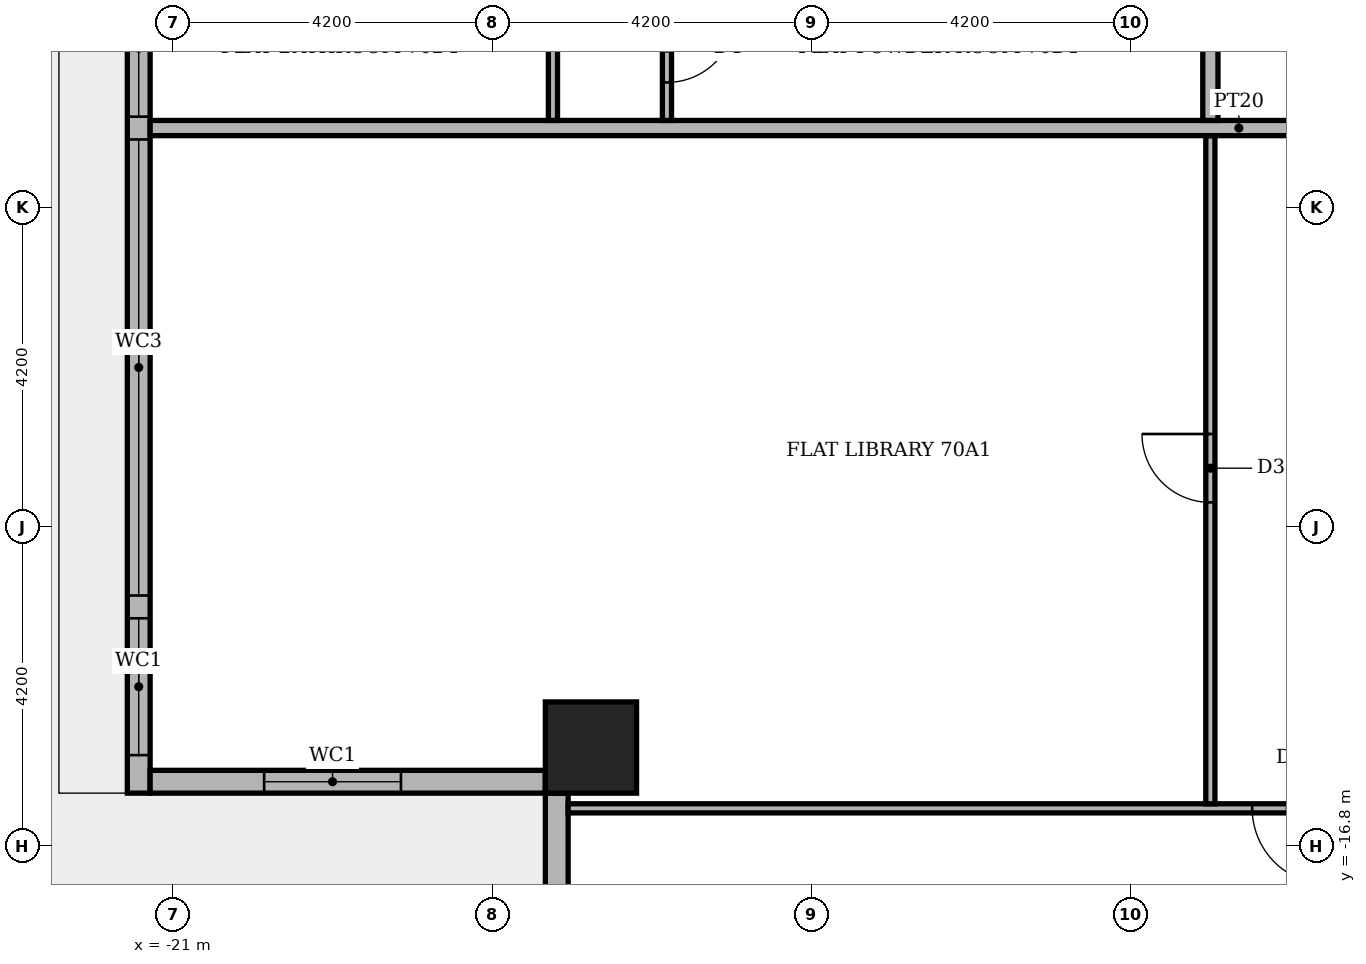
"""IFC4 building model, lengths in metres.
Left out: names, types, materials, properties, quantities, classifications, styles, units other than length and angle.
Written with IfcOpenShell. Run it as: python <this file> out.ifc"""

import sys

from ifc_helpers import new_model, si_unit, direction, frame, frame_2d, origin, origin_2d, place, context, subcontext, project, spatial, rectangle, extrude, element, fill, save


model = new_model("IFC4")
c1 = context("Model", 3, precision=1e-05, world=origin(), true_north=direction((0.0, 1.0)))
c2 = subcontext(c1, "Body", "Model", "MODEL_VIEW")
j1 = project(units=[si_unit("LENGTHUNIT", "METRE"), si_unit("PLANEANGLEUNIT", "RADIAN")], contexts=[c1])
p1 = place(None, origin())
s1 = spatial("IfcSite", under=j1, at=p1, CompositionType="ELEMENT")
p2 = place(p1, origin())
s2 = spatial("IfcBuilding", under=s1, at=p2, CompositionType="ELEMENT")
p3 = place(p2, frame((0.0, 0.0, 292.8)))
s3 = spatial("IfcBuildingStorey", under=s2, at=p3, CompositionType="ELEMENT", Elevation=292.8)
p4 = place(p3, frame((-15.5, -15.5, -0.35), z_axis=(0.0, 0.0, 1.0), x_axis=(1.0, 0.0, 0.0)))
e1 = element("IfcColumn", 1, at=p4, inside=s3, PredefinedType="COLUMN", context=c2, shape_type="SweptSolid", body=[
    extrude(rectangle(XDim=1.2, YDim=1.2, at=origin_2d()), origin(), (0.0, 0.0, 1.0), 4.25),
])
p5 = place(p3, frame((-21.45, 15.8, 0.0), z_axis=(0.0, 0.0, 1.0), x_axis=(0.0, -1.0, 0.0)))
e2 = element("IfcWall", 2, at=p5, inside=s3, PredefinedType="STANDARD", context=c2, shape_type="SweptSolid", body=[
    extrude(rectangle(XDim=31.9, YDim=0.3, at=frame_2d((15.95, 0.0))), origin(), (0.0, 0.0, 1.0), 3.55),
])
p6 = place(p5, frame((0.2, 0.0, 0.6)))
e3 = element("IfcOpeningElement", 3, at=p6, cuts=e2, PredefinedType="OPENING", context=c2, shape_type="SweptSolid", body=[
    extrude(rectangle(XDim=3.9, YDim=2.4, at=frame_2d((1.95, 1.2))), frame((0.0, 0.16, 0.0), z_axis=(0.0, -1.0, 0.0), x_axis=(1.0, 0.0, 0.0)), (0.0, 0.0, 1.0), 0.32),
])
p7 = place(p5, frame((4.4, 0.0, 0.0)))
e4 = element("IfcOpeningElement", 4, at=p7, cuts=e2, PredefinedType="OPENING", context=c2, shape_type="SweptSolid", body=[
    extrude(rectangle(XDim=3.9, YDim=2.4, at=frame_2d((1.95, 1.2))), frame((0.0, 0.16, 0.0), z_axis=(0.0, -1.0, 0.0), x_axis=(1.0, 0.0, 0.0)), (0.0, 0.0, 1.0), 0.32),
])
p8 = place(p5, frame((8.6, 0.0, 0.6)))
e5 = element("IfcOpeningElement", 5, at=p8, cuts=e2, PredefinedType="OPENING", context=c2, shape_type="SweptSolid", body=[
    extrude(rectangle(XDim=1.8, YDim=2.4, at=frame_2d((0.9, 1.2))), frame((0.0, 0.16, 0.0), z_axis=(0.0, -1.0, 0.0), x_axis=(1.0, 0.0, 0.0)), (0.0, 0.0, 1.0), 0.32),
])
p9 = place(p5, frame((10.7, 0.0, 0.6)))
e6 = element("IfcOpeningElement", 6, at=p9, cuts=e2, PredefinedType="OPENING", context=c2, shape_type="SweptSolid", body=[
    extrude(rectangle(XDim=1.8, YDim=2.4, at=frame_2d((0.9, 1.2))), frame((0.0, 0.16, 0.0), z_axis=(0.0, -1.0, 0.0), x_axis=(1.0, 0.0, 0.0)), (0.0, 0.0, 1.0), 0.32),
])
p10 = place(p5, frame((12.8, 0.0, 0.0)))
e7 = element("IfcOpeningElement", 7, at=p10, cuts=e2, PredefinedType="OPENING", context=c2, shape_type="SweptSolid", body=[
    extrude(rectangle(XDim=3.9, YDim=2.4, at=frame_2d((1.95, 1.2))), frame((0.0, 0.16, 0.0), z_axis=(0.0, -1.0, 0.0), x_axis=(1.0, 0.0, 0.0)), (0.0, 0.0, 1.0), 0.32),
])
p11 = place(p5, frame((17.0, 0.0, 0.6)))
e8 = element("IfcOpeningElement", 8, at=p11, cuts=e2, PredefinedType="OPENING", context=c2, shape_type="SweptSolid", body=[
    extrude(rectangle(XDim=1.8, YDim=2.4, at=frame_2d((0.9, 1.2))), frame((0.0, 0.16, 0.0), z_axis=(0.0, -1.0, 0.0), x_axis=(1.0, 0.0, 0.0)), (0.0, 0.0, 1.0), 0.32),
])
p12 = place(p5, frame((19.1, 0.0, 0.6)))
e9 = element("IfcOpeningElement", 9, at=p12, cuts=e2, PredefinedType="OPENING", context=c2, shape_type="SweptSolid", body=[
    extrude(rectangle(XDim=1.8, YDim=2.4, at=frame_2d((0.9, 1.2))), frame((0.0, 0.16, 0.0), z_axis=(0.0, -1.0, 0.0), x_axis=(1.0, 0.0, 0.0)), (0.0, 0.0, 1.0), 0.32),
])
p13 = place(p5, frame((21.2, 0.0, 0.6)))
e10 = element("IfcOpeningElement", 10, at=p13, cuts=e2, PredefinedType="OPENING", context=c2, shape_type="SweptSolid", body=[
    extrude(rectangle(XDim=1.8, YDim=2.4, at=frame_2d((0.9, 1.2))), frame((0.0, 0.16, 0.0), z_axis=(0.0, -1.0, 0.0), x_axis=(1.0, 0.0, 0.0)), (0.0, 0.0, 1.0), 0.32),
])
p14 = place(p5, frame((23.3, 0.0, 0.6)))
e11 = element("IfcOpeningElement", 11, at=p14, cuts=e2, PredefinedType="OPENING", context=c2, shape_type="SweptSolid", body=[
    extrude(rectangle(XDim=6.0, YDim=2.4, at=frame_2d((3.0, 1.2))), frame((0.0, 0.16, 0.0), z_axis=(0.0, -1.0, 0.0), x_axis=(1.0, 0.0, 0.0)), (0.0, 0.0, 1.0), 0.32),
])
p15 = place(p5, frame((29.6, 0.0, 0.6)))
e12 = element("IfcOpeningElement", 12, at=p15, cuts=e2, PredefinedType="OPENING", context=c2, shape_type="SweptSolid", body=[
    extrude(rectangle(XDim=1.8, YDim=2.4, at=frame_2d((0.9, 1.2))), frame((0.0, 0.16, 0.0), z_axis=(0.0, -1.0, 0.0), x_axis=(1.0, 0.0, 0.0)), (0.0, 0.0, 1.0), 0.32),
])
p16 = place(p3, frame((-21.3, -15.95, 0.0), z_axis=(0.0, 0.0, 1.0), x_axis=(1.0, 0.0, 0.0)))
e13 = element("IfcWall", 13, at=p16, inside=s3, PredefinedType="STANDARD", context=c2, shape_type="SweptSolid", body=[
    extrude(rectangle(XDim=5.2, YDim=0.3, at=frame_2d((2.6, 0.0))), origin(), (0.0, 0.0, 1.0), 3.55),
])
p17 = place(p16, frame((1.5, 0.0, 0.6)))
e14 = element("IfcOpeningElement", 14, at=p17, cuts=e13, PredefinedType="OPENING", context=c2, shape_type="SweptSolid", body=[
    extrude(rectangle(XDim=1.8, YDim=2.4, at=frame_2d((0.9, 1.2))), frame((0.0, 0.16, 0.0), z_axis=(0.0, -1.0, 0.0), x_axis=(1.0, 0.0, 0.0)), (0.0, 0.0, 1.0), 0.32),
])
p18 = place(p3, frame((-15.95, -16.1, 0.0), z_axis=(0.0, 0.0, 1.0), x_axis=(0.0, -1.0, 0.0)))
e15 = element("IfcWall", 15, at=p18, inside=s3, PredefinedType="STANDARD", context=c2, shape_type="SweptSolid", body=[
    extrude(rectangle(XDim=5.5, YDim=0.3, at=frame_2d((2.75, 0.0))), origin(), (0.0, 0.0, 1.0), 3.55),
])
p19 = place(p18, frame((1.9, 0.0, 0.0)))
e16 = element("IfcOpeningElement", 16, at=p19, cuts=e15, PredefinedType="OPENING", context=c2, shape_type="SweptSolid", body=[
    extrude(rectangle(XDim=1.8, YDim=2.4, at=frame_2d((0.9, 1.2))), frame((0.0, 0.16, 0.0), z_axis=(0.0, -1.0, 0.0), x_axis=(1.0, 0.0, 0.0)), (0.0, 0.0, 1.0), 0.32),
])
p20 = place(p3, frame((-15.8, -16.3, 0.0), z_axis=(0.0, 0.0, 1.0), x_axis=(1.0, 0.0, 0.0)))
e17 = element("IfcWall", 17, at=p20, inside=s3, PredefinedType="PARTITIONING", context=c2, shape_type="SweptSolid", body=[
    extrude(rectangle(XDim=23.05, YDim=0.12, at=frame_2d((11.525, 0.0))), origin(), (0.0, 0.0, 1.0), 3.55),
])
p21 = place(p20, frame((9.0, 0.0, 0.0)))
e18 = element("IfcOpeningElement", 18, at=p21, cuts=e17, PredefinedType="OPENING", context=c2, shape_type="SweptSolid", body=[
    extrude(rectangle(XDim=1.0, YDim=2.1, at=frame_2d((0.5, 1.05))), frame((0.0, 0.07, 0.0), z_axis=(0.0, -1.0, 0.0), x_axis=(1.0, 0.0, 0.0)), (0.0, 0.0, 1.0), 0.14),
])
p22 = place(p20, frame((12.15, 0.0, 0.0)))
e19 = element("IfcOpeningElement", 19, at=p22, cuts=e17, PredefinedType="OPENING", context=c2, shape_type="SweptSolid", body=[
    extrude(rectangle(XDim=1.0, YDim=2.1, at=frame_2d((0.5, 1.05))), frame((0.0, 0.07, 0.0), z_axis=(0.0, -1.0, 0.0), x_axis=(1.0, 0.0, 0.0)), (0.0, 0.0, 1.0), 0.14),
])
p23 = place(p20, frame((16.4, 0.0, 0.0)))
e20 = element("IfcOpeningElement", 20, at=p23, cuts=e17, PredefinedType="OPENING", context=c2, shape_type="SweptSolid", body=[
    extrude(rectangle(XDim=0.9, YDim=2.1, at=frame_2d((0.45, 1.05))), frame((0.0, 0.07, 0.0), z_axis=(0.0, -1.0, 0.0), x_axis=(1.0, 0.0, 0.0)), (0.0, 0.0, 1.0), 0.14),
])
p24 = place(p3, frame((-7.35, -16.24, 0.0), z_axis=(0.0, 0.0, 1.0), x_axis=(0.0, 1.0, 0.0)))
e21 = element("IfcWall", 21, at=p24, inside=s3, PredefinedType="PARTITIONING", context=c2, shape_type="SweptSolid", body=[
    extrude(rectangle(XDim=8.79, YDim=0.12, at=frame_2d((4.395, 0.0))), origin(), (0.0, 0.0, 1.0), 3.55),
])
p25 = place(p24, frame((3.965, 0.0, 0.0)))
e22 = element("IfcOpeningElement", 22, at=p25, cuts=e21, PredefinedType="OPENING", context=c2, shape_type="SweptSolid", body=[
    extrude(rectangle(XDim=0.9, YDim=2.1, at=frame_2d((0.45, 1.05))), frame((0.0, 0.07, 0.0), z_axis=(0.0, -1.0, 0.0), x_axis=(1.0, 0.0, 0.0)), (0.0, 0.0, 1.0), 0.14),
])
p26 = place(p3, frame((-21.3, -7.35, 0.0), z_axis=(0.0, 0.0, 1.0), x_axis=(1.0, 0.0, 0.0)))
e23 = element("IfcWall", 23, at=p26, inside=s3, PredefinedType="PARTITIONING", context=c2, shape_type="SweptSolid", body=[
    extrude(rectangle(XDim=28.65, YDim=0.2, at=frame_2d((14.325, 0.0))), origin(), (0.0, 0.0, 1.0), 3.55),
])
p27 = place(p26, frame((16.55, 0.0, 0.0)))
e24 = element("IfcOpeningElement", 24, at=p27, cuts=e23, PredefinedType="OPENING", context=c2, shape_type="SweptSolid", body=[
    extrude(rectangle(XDim=1.1, YDim=2.4, at=frame_2d((0.55, 1.2))), frame((0.0, 0.11, 0.0), z_axis=(0.0, -1.0, 0.0), x_axis=(1.0, 0.0, 0.0)), (0.0, 0.0, 1.0), 0.22),
])
p28 = place(p3, frame((-16.0, -7.25, 0.0), z_axis=(0.0, 0.0, 1.0), x_axis=(0.0, 1.0, 0.0)))
e25 = element("IfcWall", 25, at=p28, inside=s3, PredefinedType="PARTITIONING", context=c2, shape_type="SweptSolid", body=[
    extrude(rectangle(XDim=1.94, YDim=0.12, at=frame_2d((0.97, 0.0))), origin(), (0.0, 0.0, 1.0), 3.55),
])
p29 = place(p3, frame((-14.5, -7.25, 0.0), z_axis=(0.0, 0.0, 1.0), x_axis=(0.0, 1.0, 0.0)))
e26 = element("IfcWall", 26, at=p29, inside=s3, PredefinedType="PARTITIONING", context=c2, shape_type="SweptSolid", body=[
    extrude(rectangle(XDim=1.94, YDim=0.12, at=frame_2d((0.97, 0.0))), origin(), (0.0, 0.0, 1.0), 3.55),
])
p30 = place(p29, frame((0.5, 0.0, 0.0)))
e27 = element("IfcOpeningElement", 27, at=p30, cuts=e26, PredefinedType="OPENING", context=c2, shape_type="SweptSolid", body=[
    extrude(rectangle(XDim=0.9, YDim=2.1, at=frame_2d((0.45, 1.05))), frame((0.0, 0.07, 0.0), z_axis=(0.0, -1.0, 0.0), x_axis=(1.0, 0.0, 0.0)), (0.0, 0.0, 1.0), 0.14),
])
p31 = place(p3, frame((-7.35, -7.25, 0.0), z_axis=(0.0, 0.0, 1.0), x_axis=(0.0, 1.0, 0.0)))
e28 = element("IfcWall", 28, at=p31, inside=s3, PredefinedType="PARTITIONING", context=c2, shape_type="SweptSolid", body=[
    extrude(rectangle(XDim=14.5, YDim=0.2, at=frame_2d((7.25, 0.0))), origin(), (0.0, 0.0, 1.0), 3.55),
])
p32 = place(p31, frame((10.9, 0.0, 0.0)))
e29 = element("IfcOpeningElement", 29, at=p32, cuts=e28, PredefinedType="OPENING", context=c2, shape_type="SweptSolid", body=[
    extrude(rectangle(XDim=1.1, YDim=2.4, at=frame_2d((0.55, 1.2))), frame((0.0, 0.11, 0.0), z_axis=(0.0, -1.0, 0.0), x_axis=(1.0, 0.0, 0.0)), (0.0, 0.0, 1.0), 0.22),
])
p33 = place(p13, origin())
e30 = element("IfcWindow", 30, at=p33, inside=s3, PartitioningType="SINGLE_PANEL", PredefinedType="WINDOW", context=c2, shape_type="SweptSolid", body=[
    extrude(rectangle(XDim=1.8, YDim=2.4, at=frame_2d((0.9, 1.2))), frame((0.0, 0.03, 0.0), z_axis=(0.0, -1.0, 0.0), x_axis=(1.0, 0.0, 0.0)), (0.0, 0.0, 1.0), 0.06),
])
fill(e10, e30)
p34 = place(p14, origin())
e31 = element("IfcWindow", 31, at=p34, inside=s3, PartitioningType="SINGLE_PANEL", PredefinedType="WINDOW", context=c2, shape_type="SweptSolid", body=[
    extrude(rectangle(XDim=6.0, YDim=2.4, at=frame_2d((3.0, 1.2))), frame((0.0, 0.03, 0.0), z_axis=(0.0, -1.0, 0.0), x_axis=(1.0, 0.0, 0.0)), (0.0, 0.0, 1.0), 0.06),
])
fill(e11, e31)
p35 = place(p15, origin())
e32 = element("IfcWindow", 32, at=p35, inside=s3, PartitioningType="SINGLE_PANEL", PredefinedType="WINDOW", context=c2, shape_type="SweptSolid", body=[
    extrude(rectangle(XDim=1.8, YDim=2.4, at=frame_2d((0.9, 1.2))), frame((0.0, 0.03, 0.0), z_axis=(0.0, -1.0, 0.0), x_axis=(1.0, 0.0, 0.0)), (0.0, 0.0, 1.0), 0.06),
])
fill(e12, e32)
p36 = place(p17, origin())
e33 = element("IfcWindow", 33, at=p36, inside=s3, PartitioningType="SINGLE_PANEL", PredefinedType="WINDOW", context=c2, shape_type="SweptSolid", body=[
    extrude(rectangle(XDim=1.8, YDim=2.4, at=frame_2d((0.9, 1.2))), frame((0.0, 0.03, 0.0), z_axis=(0.0, -1.0, 0.0), x_axis=(1.0, 0.0, 0.0)), (0.0, 0.0, 1.0), 0.06),
])
fill(e14, e33)
p37 = place(p25, origin())
e34 = element("IfcDoor", 34, at=p37, inside=s3, OperationType="SINGLE_SWING_RIGHT", PredefinedType="DOOR", context=c2, shape_type="SweptSolid", body=[
    extrude(rectangle(XDim=0.9, YDim=2.1, at=frame_2d((0.45, 1.05))), frame((0.0, 0.025, 0.0), z_axis=(0.0, -1.0, 0.0), x_axis=(1.0, 0.0, 0.0)), (0.0, 0.0, 1.0), 0.05),
])
fill(e22, e34)
p38 = place(p21, frame((1.0, 0.0, 0.0), z_axis=(0.0, 0.0, 1.0), x_axis=(-1.0, 0.0, 0.0)))
e35 = element("IfcDoor", 35, at=p38, inside=s3, OperationType="SINGLE_SWING_RIGHT", PredefinedType="DOOR", context=c2, shape_type="SweptSolid", body=[
    extrude(rectangle(XDim=1.0, YDim=2.1, at=frame_2d((0.5, 1.05))), frame((0.0, 0.025, 0.0), z_axis=(0.0, -1.0, 0.0), x_axis=(1.0, 0.0, 0.0)), (0.0, 0.0, 1.0), 0.05),
])
fill(e18, e35)
p39 = place(p30, frame((0.9, 0.0, 0.0), z_axis=(0.0, 0.0, 1.0), x_axis=(-1.0, 0.0, 0.0)))
e36 = element("IfcDoor", 36, at=p39, inside=s3, OperationType="SINGLE_SWING_RIGHT", PredefinedType="DOOR", context=c2, shape_type="SweptSolid", body=[
    extrude(rectangle(XDim=0.9, YDim=2.1, at=frame_2d((0.45, 1.05))), frame((0.0, 0.025, 0.0), z_axis=(0.0, -1.0, 0.0), x_axis=(1.0, 0.0, 0.0)), (0.0, 0.0, 1.0), 0.05),
])
fill(e27, e36)
save(model, sys.argv[1])
